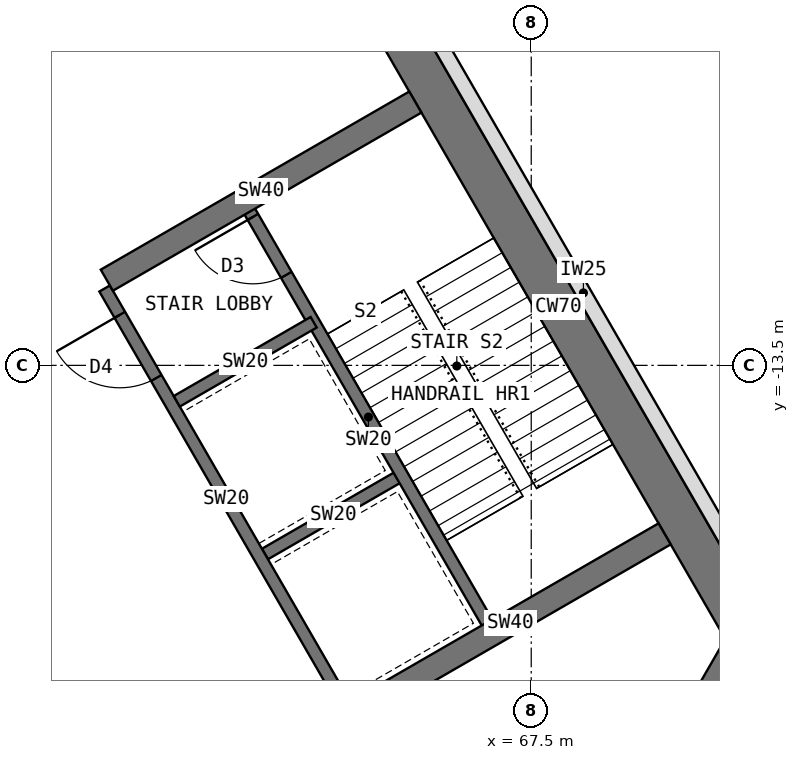
"""IFC4 building model, lengths in metres.
Left out: names, types, materials, properties, quantities, classifications, styles, units other than length and angle.
Written with IfcOpenShell. Run it as: python <this file> out.ifc"""

import sys

from ifc_helpers import new_model, si_unit, direction, frame, frame_2d, origin, place, context, subcontext, project, spatial, rectangle, extrude, element, fill, save


model = new_model("IFC4")
c1 = context("Model", 3, precision=1e-05, world=origin(), true_north=direction((0.0, 1.0)))
c2 = subcontext(c1, "Body", "Model", "MODEL_VIEW")
j1 = project(units=[si_unit("LENGTHUNIT", "METRE"), si_unit("PLANEANGLEUNIT", "RADIAN")], contexts=[c1])
p1 = place(None, origin())
s1 = spatial("IfcSite", under=j1, at=p1, CompositionType="ELEMENT")
p2 = place(p1, origin())
s2 = spatial("IfcBuilding", under=s1, at=p2, CompositionType="ELEMENT")
p3 = place(p2, origin())
s3 = spatial("IfcBuildingStorey", under=s2, at=p3, CompositionType="ELEMENT", Elevation=0.0)
p4 = place(p3, frame((68.822, -21.939, 0.0), z_axis=(0.0, 0.0, 1.0), x_axis=(0.500024481964, 0.866011268655, 0.0)))
e1 = element("IfcWall", 1, at=p4, inside=s3, PredefinedType="SHEAR", context=c2, shape_type="SweptSolid", body=[
    extrude(rectangle(XDim=4.548, YDim=0.7, at=frame_2d((2.274, 0.0))), origin(), (0.0, 0.0, 1.0), 5.5),
])
p5 = place(p3, frame((71.096, -18.0, 0.0), z_axis=(0.0, 0.0, 1.0), x_axis=(-0.500005998175, 0.866021940709, 0.0)))
e2 = element("IfcWall", 2, at=p5, inside=s3, PredefinedType="SHEAR", context=c2, shape_type="SweptSolid", body=[
    extrude(rectangle(XDim=12.596, YDim=0.7, at=frame_2d((6.298, 0.0))), origin(), (0.0, 0.0, 1.0), 5.5),
])
p6 = place(p3, frame((64.484, -19.164, 0.0), z_axis=(0.0, 0.0, 1.0), x_axis=(-0.49999894854, 0.866026010844, 0.0)))
e3 = element("IfcWall", 3, at=p6, inside=s3, PredefinedType="SHEAR", context=c2, shape_type="SweptSolid", body=[
    extrude(rectangle(XDim=8.0, YDim=0.2, at=frame_2d((4.0, 0.0))), origin(), (0.0, 0.0, 1.0), 5.5),
])
p7 = place(p6, frame((6.3, 0.0, 0.0)))
e4 = element("IfcOpeningElement", 4, at=p7, cuts=e3, PredefinedType="OPENING", context=c2, shape_type="SweptSolid", body=[
    extrude(rectangle(XDim=1.2, YDim=2.1, at=frame_2d((0.6, 1.05))), frame((0.0, 0.11, 0.0), z_axis=(0.0, -1.0, 0.0), x_axis=(1.0, 0.0, 0.0)), (0.0, 0.0, 1.0), 0.22),
])
p8 = place(p3, frame((63.12, -16.603, 0.0), z_axis=(0.0, 0.0, 1.0), x_axis=(0.866062058628, 0.499936506574, 0.0)))
e5 = element("IfcWall", 5, at=p8, inside=s3, PredefinedType="SHEAR", context=c2, shape_type="SweptSolid", body=[
    extrude(rectangle(XDim=2.6, YDim=0.2, at=frame_2d((1.3, 0.0))), origin(), (0.0, 0.0, 1.0), 5.5),
])
p9 = place(p3, frame((61.67, -14.091, 0.0), z_axis=(0.0, 0.0, 1.0), x_axis=(0.86603858612, 0.49997716683, 0.0)))
e6 = element("IfcWall", 6, at=p9, inside=s3, PredefinedType="SHEAR", context=c2, shape_type="SweptSolid", body=[
    extrude(rectangle(XDim=2.6, YDim=0.2, at=frame_2d((1.3, 0.0))), origin(), (0.0, 0.0, 1.0), 5.5),
])
p10 = place(p3, frame((66.822, -17.814, 0.0), z_axis=(0.0, 0.0, 1.0), x_axis=(-0.49999894854, 0.866026010844, 0.0)))
e7 = element("IfcWall", 7, at=p10, inside=s3, PredefinedType="SHEAR", context=c2, shape_type="SweptSolid", body=[
    extrude(rectangle(XDim=8.0, YDim=0.2, at=frame_2d((4.0, 0.0))), origin(), (0.0, 0.0, 1.0), 5.5),
])
p11 = place(p10, frame((6.7, 0.0, 0.0)))
e8 = element("IfcOpeningElement", 8, at=p11, cuts=e7, PredefinedType="OPENING", context=c2, shape_type="SweptSolid", body=[
    extrude(rectangle(XDim=1.1, YDim=2.1, at=frame_2d((0.55, 1.05))), frame((0.0, 0.11, 0.0), z_axis=(0.0, -1.0, 0.0), x_axis=(1.0, 0.0, 0.0)), (0.0, 0.0, 1.0), 0.22),
])
for number, where, z_axis, x_axis in (
    (9, (60.52, -12.099, 0.0), (0.0, 0.0, 1.0), (0.866, 0.5, 0.0)),
    (10, (64.62, -19.201, 0.0), (0.0, 0.0, 1.0), (0.866, 0.5, 0.0)),
):
    element("IfcWall", number, at=place(p3, frame(where, z_axis=z_axis, x_axis=x_axis)), inside=s3, PredefinedType="SHEAR", context=c2, shape_type="SweptSolid", body=[
        extrude(rectangle(XDim=5.858, YDim=0.4, at=frame_2d((2.929, 0.0))), origin(), (0.0, 0.0, 1.0), 5.5),
    ])
p12 = place(p3, frame((65.375, -7.141, 0.0), z_axis=(0.0, 0.0, 1.0), x_axis=(0.499996365031, -0.866027502425, 0.0)))
e11 = element("IfcWall", 11, at=p12, inside=s3, PredefinedType="STANDARD", context=c2, shape_type="SweptSolid", body=[
    extrude(rectangle(XDim=11.933, YDim=0.25, at=frame_2d((5.967, 0.0))), origin(), (0.0, 0.0, 1.0), 5.15),
])
p13 = place(p7, origin())
e12 = element("IfcDoor", 12, at=p13, inside=s3, OperationType="SINGLE_SWING_RIGHT", PredefinedType="DOOR", context=c2, shape_type="SweptSolid", body=[
    extrude(rectangle(XDim=1.2, YDim=2.1, at=frame_2d((0.6, 1.05))), frame((0.0, 0.025, 0.0), z_axis=(0.0, -1.0, 0.0), x_axis=(1.0, 0.0, 0.0)), (0.0, 0.0, 1.0), 0.05),
])
fill(e4, e12)
p14 = place(p11, origin())
e13 = element("IfcDoor", 13, at=p14, inside=s3, OperationType="SINGLE_SWING_RIGHT", PredefinedType="DOOR", context=c2, shape_type="SweptSolid", body=[
    extrude(rectangle(XDim=1.1, YDim=2.1, at=frame_2d((0.55, 1.05))), frame((0.0, 0.025, 0.0), z_axis=(0.0, -1.0, 0.0), x_axis=(1.0, 0.0, 0.0)), (0.0, 0.0, 1.0), 0.05),
])
fill(e8, e13)
save(model, sys.argv[1])
